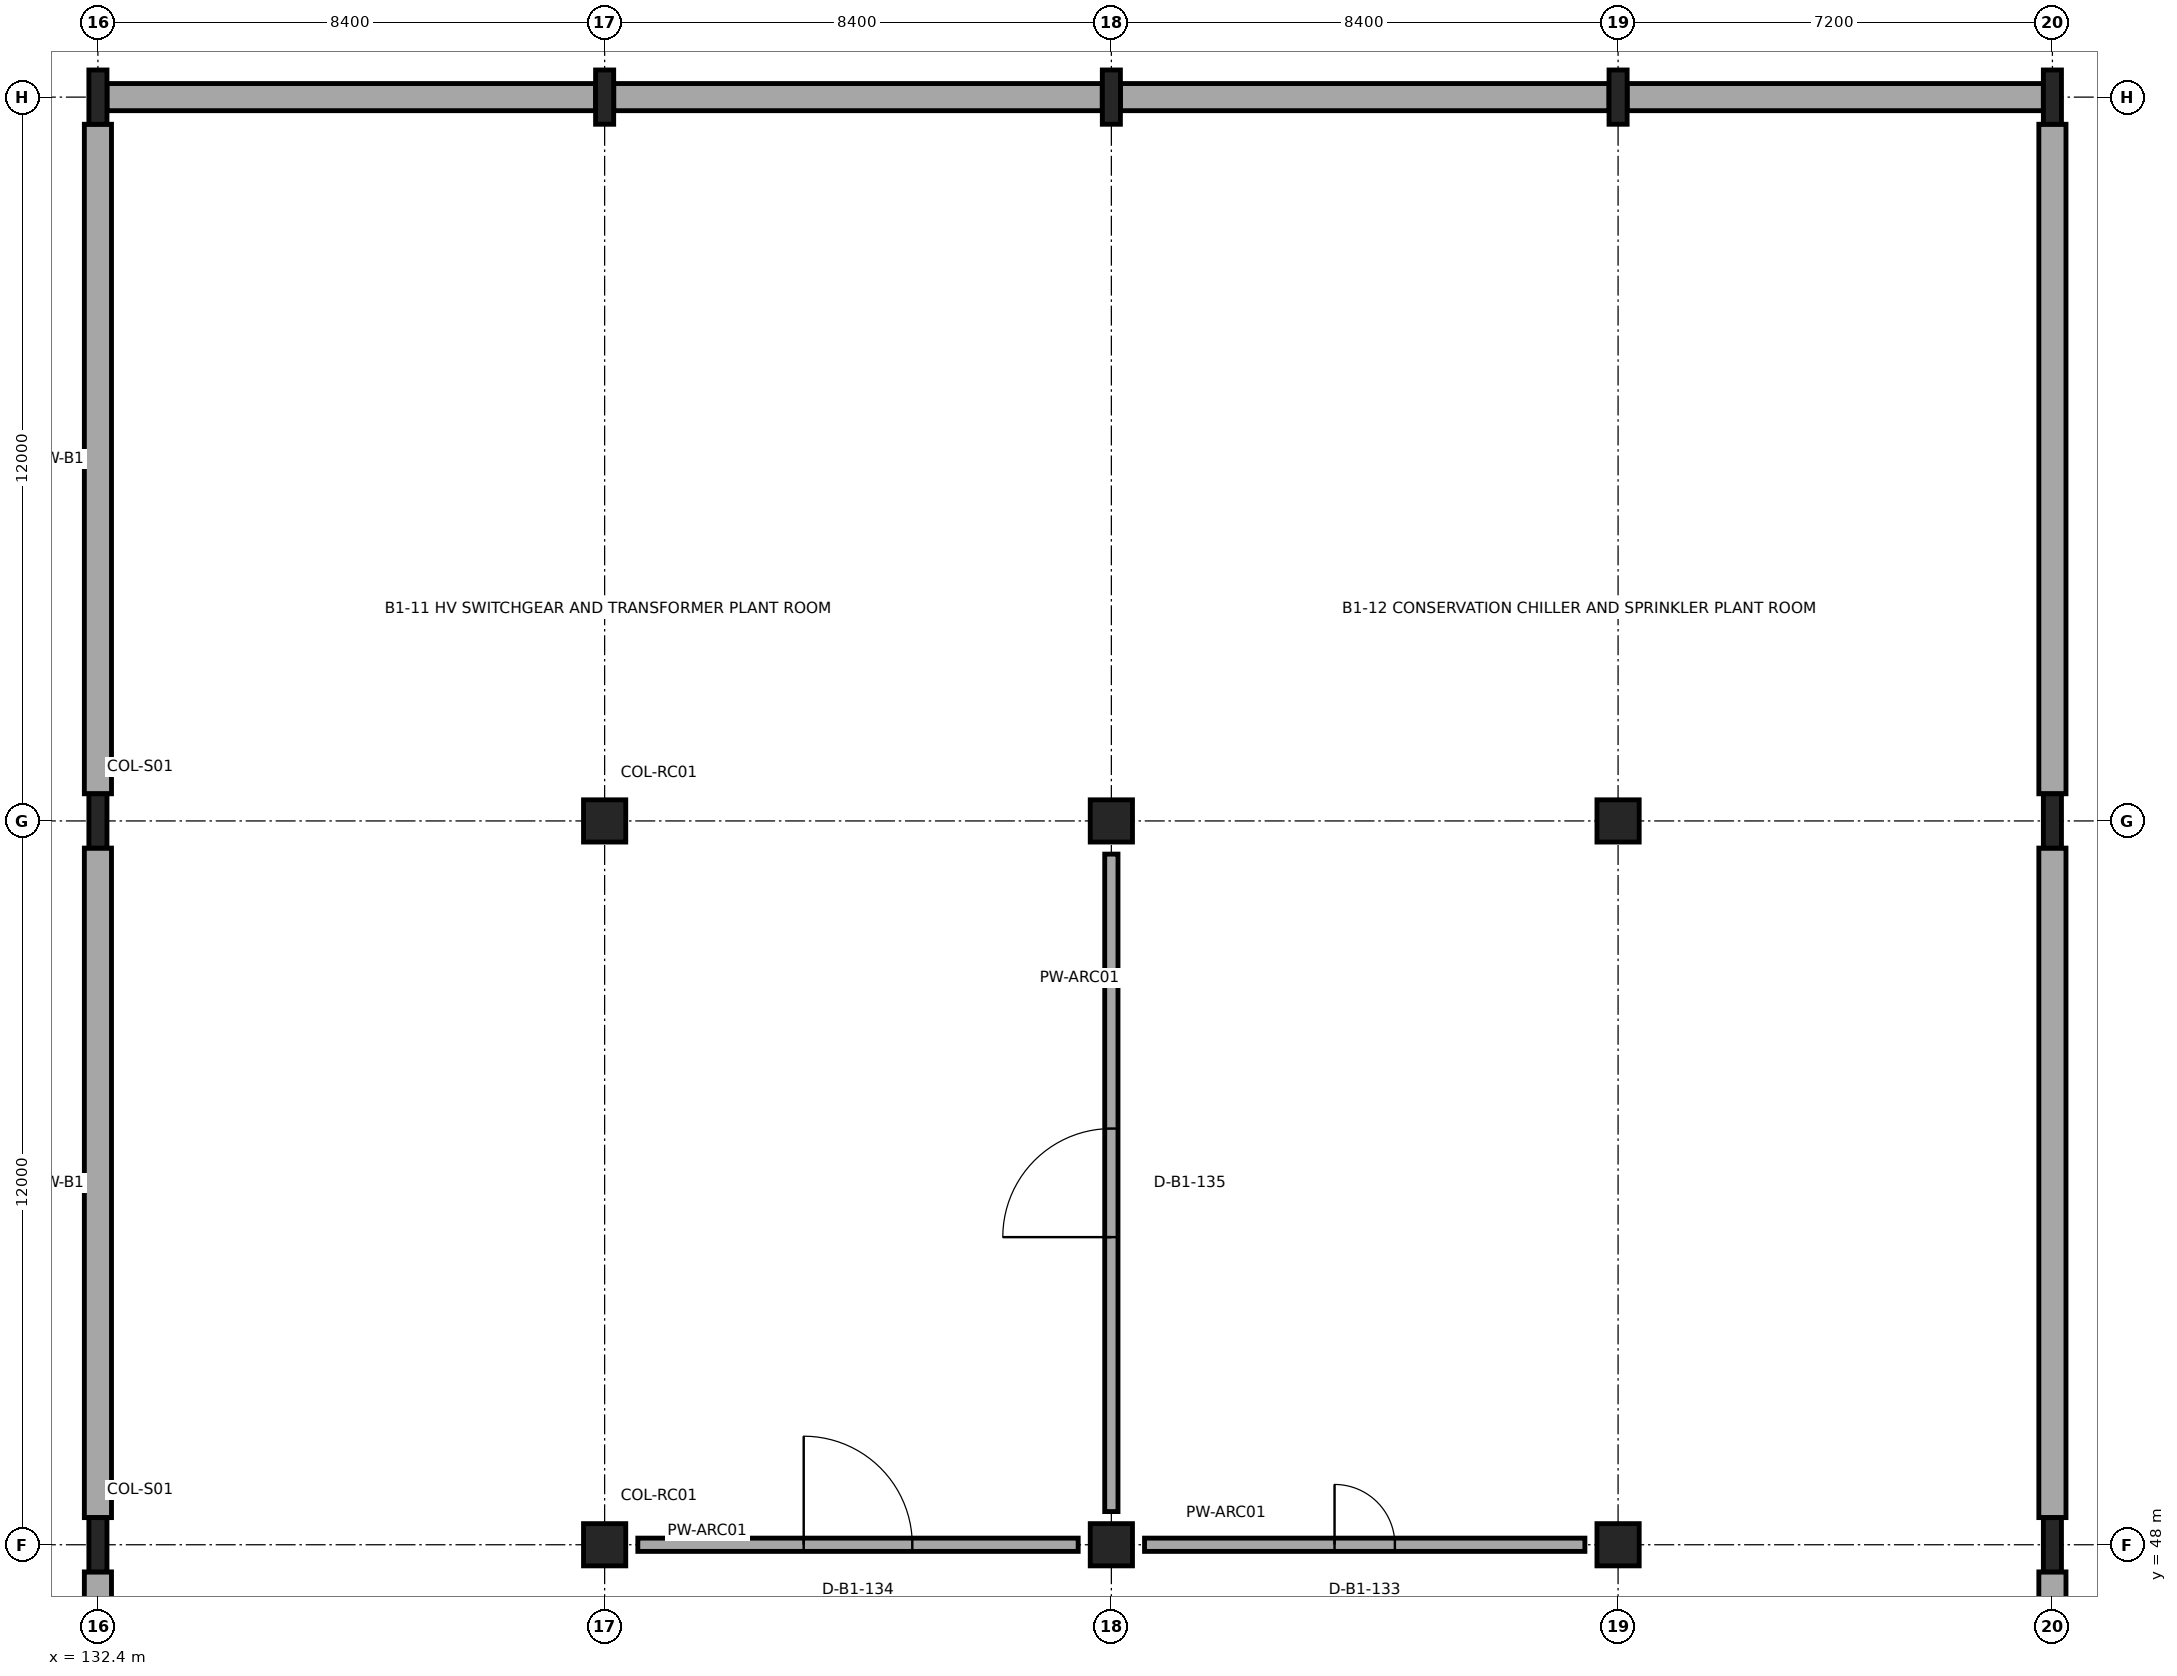
"""IFC4 building model, lengths in metres.
Left out: names, types, materials, properties, quantities, classifications, styles, units other than length and angle.
Written with IfcOpenShell. Run it as: python <this file> out.ifc"""

import sys

from ifc_helpers import new_model, si_unit, direction, frame, frame_2d, origin, origin_2d, place, context, subcontext, project, spatial, rectangle, i_section, extrude, element, fill, save


model = new_model("IFC4")
c1 = context("Model", 3, precision=1e-05, world=origin(), true_north=direction((0.0, 1.0)))
c2 = subcontext(c1, "Body", "Model", "MODEL_VIEW")
j1 = project(units=[si_unit("LENGTHUNIT", "METRE"), si_unit("PLANEANGLEUNIT", "RADIAN")], contexts=[c1])
p1 = place(None, origin())
s1 = spatial("IfcSite", under=j1, at=p1, CompositionType="ELEMENT")
p2 = place(p1, origin())
s2 = spatial("IfcBuilding", under=s1, at=p2, CompositionType="ELEMENT")
p3 = place(p2, frame((0.0, 0.0, -4.8)))
s3 = spatial("IfcBuildingStorey", under=s2, at=p3, CompositionType="ELEMENT", Elevation=-4.8)
for number, where, z_axis, x_axis in (
    (1, (132.4, 48.0, 0.0), (0.0, 0.0, 1.0), (1.0, 0.0, 0.0)),
    (2, (132.4, 60.0, 0.0), (0.0, 0.0, 1.0), (1.0, 0.0, 0.0)),
    (3, (132.4, 72.0, 0.0), (0.0, 0.0, 1.0), (1.0, 0.0, 0.0)),
):
    element("IfcColumn", number, at=place(p3, frame(where, z_axis=z_axis, x_axis=x_axis)), inside=s3, PredefinedType="COLUMN", context=c2, shape_type="SweptSolid", body=[
        extrude(i_section(OverallWidth=0.3, OverallDepth=0.9, WebThickness=0.019, FlangeThickness=0.035, FilletRadius=0.03, at=origin_2d()), origin(), (0.0, 0.0, 1.0), 4.8),
    ])
for number, where, z_axis, x_axis in (
    (4, (140.8, 48.0, 0.0), (0.0, 0.0, 1.0), (1.0, 0.0, 0.0)),
    (5, (140.8, 60.0, 0.0), (0.0, 0.0, 1.0), (1.0, 0.0, 0.0)),
):
    element("IfcColumn", number, at=place(p3, frame(where, z_axis=z_axis, x_axis=x_axis)), inside=s3, PredefinedType="COLUMN", context=c2, shape_type="SweptSolid", body=[
        extrude(rectangle(XDim=0.7, YDim=0.7, at=origin_2d()), origin(), (0.0, 0.0, 1.0), 4.8),
    ])
p4 = place(p3, frame((140.8, 72.0, 0.0), z_axis=(0.0, 0.0, 1.0), x_axis=(1.0, 0.0, 0.0)))
e6 = element("IfcColumn", 6, at=p4, inside=s3, PredefinedType="COLUMN", context=c2, shape_type="SweptSolid", body=[
    extrude(i_section(OverallWidth=0.3, OverallDepth=0.9, WebThickness=0.019, FlangeThickness=0.035, FilletRadius=0.03, at=origin_2d()), origin(), (0.0, 0.0, 1.0), 4.8),
])
for number, where, z_axis, x_axis in (
    (7, (149.2, 48.0, 0.0), (0.0, 0.0, 1.0), (1.0, 0.0, 0.0)),
    (8, (149.2, 60.0, 0.0), (0.0, 0.0, 1.0), (1.0, 0.0, 0.0)),
):
    element("IfcColumn", number, at=place(p3, frame(where, z_axis=z_axis, x_axis=x_axis)), inside=s3, PredefinedType="COLUMN", context=c2, shape_type="SweptSolid", body=[
        extrude(rectangle(XDim=0.7, YDim=0.7, at=origin_2d()), origin(), (0.0, 0.0, 1.0), 4.8),
    ])
p5 = place(p3, frame((149.2, 72.0, 0.0), z_axis=(0.0, 0.0, 1.0), x_axis=(1.0, 0.0, 0.0)))
e9 = element("IfcColumn", 9, at=p5, inside=s3, PredefinedType="COLUMN", context=c2, shape_type="SweptSolid", body=[
    extrude(i_section(OverallWidth=0.3, OverallDepth=0.9, WebThickness=0.019, FlangeThickness=0.035, FilletRadius=0.03, at=origin_2d()), origin(), (0.0, 0.0, 1.0), 4.8),
])
for number, where, z_axis, x_axis in (
    (10, (157.6, 48.0, 0.0), (0.0, 0.0, 1.0), (1.0, 0.0, 0.0)),
    (11, (157.6, 60.0, 0.0), (0.0, 0.0, 1.0), (1.0, 0.0, 0.0)),
):
    element("IfcColumn", number, at=place(p3, frame(where, z_axis=z_axis, x_axis=x_axis)), inside=s3, PredefinedType="COLUMN", context=c2, shape_type="SweptSolid", body=[
        extrude(rectangle(XDim=0.7, YDim=0.7, at=origin_2d()), origin(), (0.0, 0.0, 1.0), 4.8),
    ])
for number, where, z_axis, x_axis in (
    (12, (157.6, 72.0, 0.0), (0.0, 0.0, 1.0), (1.0, 0.0, 0.0)),
    (13, (164.8, 48.0, 0.0), (0.0, 0.0, 1.0), (1.0, 0.0, 0.0)),
    (14, (164.8, 60.0, 0.0), (0.0, 0.0, 1.0), (1.0, 0.0, 0.0)),
    (15, (164.8, 72.0, 0.0), (0.0, 0.0, 1.0), (1.0, 0.0, 0.0)),
):
    element("IfcColumn", number, at=place(p3, frame(where, z_axis=z_axis, x_axis=x_axis)), inside=s3, PredefinedType="COLUMN", context=c2, shape_type="SweptSolid", body=[
        extrude(i_section(OverallWidth=0.3, OverallDepth=0.9, WebThickness=0.019, FlangeThickness=0.035, FilletRadius=0.03, at=origin_2d()), origin(), (0.0, 0.0, 1.0), 4.8),
    ])
for number, where, z_axis, x_axis in (
    (16, (132.4, 36.45, 0.0), (0.0, 0.0, 1.0), (0.0, 1.0, 0.0)),
    (17, (132.4, 48.45, 0.0), (0.0, 0.0, 1.0), (0.0, 1.0, 0.0)),
    (18, (132.4, 60.45, 0.0), (0.0, 0.0, 1.0), (0.0, 1.0, 0.0)),
):
    element("IfcWall", number, at=place(p3, frame(where, z_axis=z_axis, x_axis=x_axis)), inside=s3, PredefinedType="USERDEFINED", context=c2, shape_type="SweptSolid", body=[
        extrude(rectangle(XDim=11.1, YDim=0.45, at=frame_2d((5.55, 0.0))), origin(), (0.0, 0.0, 1.0), 4.48),
    ])
p6 = place(p3, frame((132.55, 72.0, 0.0), z_axis=(0.0, 0.0, 1.0), x_axis=(1.0, 0.0, 0.0)))
e19 = element("IfcWall", 19, at=p6, inside=s3, PredefinedType="USERDEFINED", context=c2, shape_type="SweptSolid", body=[
    extrude(rectangle(XDim=8.1, YDim=0.45, at=frame_2d((4.05, 0.0))), origin(), (0.0, 0.0, 1.0), 4.48),
])
p7 = place(p3, frame((140.95, 72.0, 0.0), z_axis=(0.0, 0.0, 1.0), x_axis=(1.0, 0.0, 0.0)))
e20 = element("IfcWall", 20, at=p7, inside=s3, PredefinedType="USERDEFINED", context=c2, shape_type="SweptSolid", body=[
    extrude(rectangle(XDim=8.1, YDim=0.45, at=frame_2d((4.05, 0.0))), origin(), (0.0, 0.0, 1.0), 4.48),
])
p8 = place(p3, frame((149.35, 72.0, 0.0), z_axis=(0.0, 0.0, 1.0), x_axis=(1.0, 0.0, 0.0)))
e21 = element("IfcWall", 21, at=p8, inside=s3, PredefinedType="USERDEFINED", context=c2, shape_type="SweptSolid", body=[
    extrude(rectangle(XDim=8.1, YDim=0.45, at=frame_2d((4.05, 0.0))), origin(), (0.0, 0.0, 1.0), 4.48),
])
p9 = place(p3, frame((157.75, 72.0, 0.0), z_axis=(0.0, 0.0, 1.0), x_axis=(1.0, 0.0, 0.0)))
e22 = element("IfcWall", 22, at=p9, inside=s3, PredefinedType="USERDEFINED", context=c2, shape_type="SweptSolid", body=[
    extrude(rectangle(XDim=6.9, YDim=0.45, at=frame_2d((3.45, 0.0))), origin(), (0.0, 0.0, 1.0), 4.48),
])
for number, where, z_axis, x_axis in (
    (23, (164.8, 71.55, 0.0), (0.0, 0.0, 1.0), (0.0, -1.0, 0.0)),
    (24, (164.8, 59.55, 0.0), (0.0, 0.0, 1.0), (0.0, -1.0, 0.0)),
    (25, (164.8, 47.55, 0.0), (0.0, 0.0, 1.0), (0.0, -1.0, 0.0)),
):
    element("IfcWall", number, at=place(p3, frame(where, z_axis=z_axis, x_axis=x_axis)), inside=s3, PredefinedType="USERDEFINED", context=c2, shape_type="SweptSolid", body=[
        extrude(rectangle(XDim=11.1, YDim=0.45, at=frame_2d((5.55, 0.0))), origin(), (0.0, 0.0, 1.0), 4.48),
    ])
p10 = place(p3, frame((149.75, 48.0, 0.0), z_axis=(0.0, 0.0, 1.0), x_axis=(1.0, 0.0, 0.0)))
e26 = element("IfcWall", 26, at=p10, inside=s3, PredefinedType="PARTITIONING", context=c2, shape_type="SweptSolid", body=[
    extrude(rectangle(XDim=7.3, YDim=0.22, at=frame_2d((3.65, 0.0))), origin(), (0.0, 0.0, 1.0), 3.932),
])
p11 = place(p10, frame((3.15, 0.0, 0.0)))
e27 = element("IfcOpeningElement", 27, at=p11, cuts=e26, PredefinedType="OPENING", context=c2, shape_type="SweptSolid", body=[
    extrude(rectangle(XDim=1.0, YDim=2.15, at=frame_2d((0.5, 1.075))), frame((0.0, 0.12, 0.0), z_axis=(0.0, -1.0, 0.0), x_axis=(1.0, 0.0, 0.0)), (0.0, 0.0, 1.0), 0.24),
])
p12 = place(p3, frame((141.35, 48.0, 0.0), z_axis=(0.0, 0.0, 1.0), x_axis=(1.0, 0.0, 0.0)))
e28 = element("IfcWall", 28, at=p12, inside=s3, PredefinedType="PARTITIONING", context=c2, shape_type="SweptSolid", body=[
    extrude(rectangle(XDim=7.3, YDim=0.22, at=frame_2d((3.65, 0.0))), origin(), (0.0, 0.0, 1.0), 3.932),
])
p13 = place(p12, frame((2.75, 0.0, 0.0)))
e29 = element("IfcOpeningElement", 29, at=p13, cuts=e28, PredefinedType="OPENING", context=c2, shape_type="SweptSolid", body=[
    extrude(rectangle(XDim=1.8, YDim=2.2, at=frame_2d((0.9, 1.1))), frame((0.0, 0.12, 0.0), z_axis=(0.0, -1.0, 0.0), x_axis=(1.0, 0.0, 0.0)), (0.0, 0.0, 1.0), 0.24),
])
p14 = place(p3, frame((149.2, 48.55, 0.0), z_axis=(0.0, 0.0, 1.0), x_axis=(0.0, 1.0, 0.0)))
e30 = element("IfcWall", 30, at=p14, inside=s3, PredefinedType="PARTITIONING", context=c2, shape_type="SweptSolid", body=[
    extrude(rectangle(XDim=10.9, YDim=0.22, at=frame_2d((5.45, 0.0))), origin(), (0.0, 0.0, 1.0), 3.782),
])
p15 = place(p14, frame((4.55, 0.0, 0.0)))
e31 = element("IfcOpeningElement", 31, at=p15, cuts=e30, PredefinedType="OPENING", context=c2, shape_type="SweptSolid", body=[
    extrude(rectangle(XDim=1.8, YDim=2.2, at=frame_2d((0.9, 1.1))), frame((0.0, 0.12, 0.0), z_axis=(0.0, -1.0, 0.0), x_axis=(1.0, 0.0, 0.0)), (0.0, 0.0, 1.0), 0.24),
])
p16 = place(p11, origin())
e32 = element("IfcDoor", 32, at=p16, inside=s3, OperationType="SINGLE_SWING_LEFT", PredefinedType="DOOR", context=c2, shape_type="SweptSolid", body=[
    extrude(rectangle(XDim=1.0, YDim=2.15, at=frame_2d((0.5, 1.075))), frame((0.0, 0.025, 0.0), z_axis=(0.0, -1.0, 0.0), x_axis=(1.0, 0.0, 0.0)), (0.0, 0.0, 1.0), 0.05),
])
fill(e27, e32)
p17 = place(p13, origin())
e33 = element("IfcDoor", 33, at=p17, inside=s3, OperationType="DOUBLE_DOOR_SINGLE_SWING", PredefinedType="DOOR", context=c2, shape_type="SweptSolid", body=[
    extrude(rectangle(XDim=1.8, YDim=2.2, at=frame_2d((0.9, 1.1))), frame((0.0, 0.025, 0.0), z_axis=(0.0, -1.0, 0.0), x_axis=(1.0, 0.0, 0.0)), (0.0, 0.0, 1.0), 0.05),
])
fill(e29, e33)
p18 = place(p15, origin())
e34 = element("IfcDoor", 34, at=p18, inside=s3, OperationType="DOUBLE_DOOR_SINGLE_SWING", PredefinedType="DOOR", context=c2, shape_type="SweptSolid", body=[
    extrude(rectangle(XDim=1.8, YDim=2.2, at=frame_2d((0.9, 1.1))), frame((0.0, 0.025, 0.0), z_axis=(0.0, -1.0, 0.0), x_axis=(1.0, 0.0, 0.0)), (0.0, 0.0, 1.0), 0.05),
])
fill(e31, e34)
save(model, sys.argv[1])
